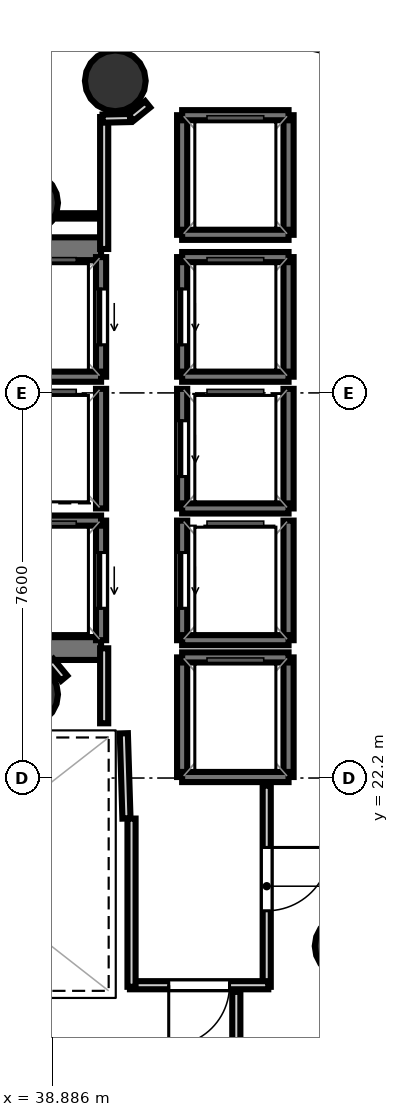
"""IFC4 building model, lengths in metres.
Left out: names, types, materials, properties, quantities, classifications, styles, units other than length and angle.
Written with IfcOpenShell. Run it as: python <this file> out.ifc"""

import sys

from ifc_helpers import new_model, si_unit, direction, frame, frame_2d, origin, origin_2d, place, context, subcontext, project, spatial, rectangle, hollow_circle, extrude, element, fill, save


model = new_model("IFC4")
c1 = context("Model", 3, precision=1e-05, world=origin(), true_north=direction((0.0, 1.0)))
c2 = subcontext(c1, "Body", "Model", "MODEL_VIEW")
j1 = project(units=[si_unit("LENGTHUNIT", "METRE"), si_unit("PLANEANGLEUNIT", "RADIAN")], contexts=[c1])
p1 = place(None, origin())
s1 = spatial("IfcSite", under=j1, at=p1, CompositionType="ELEMENT")
p2 = place(p1, origin())
s2 = spatial("IfcBuilding", under=s1, at=p2, CompositionType="ELEMENT")
p3 = place(p2, frame((0.0, 0.0, 196.6)))
s3 = spatial("IfcBuildingStorey", under=s2, at=p3, CompositionType="ELEMENT", Elevation=196.6)
p4 = place(p3, frame((29.33, 32.645, 0.0), z_axis=(0.0, 0.0, 1.0), x_axis=(1.0, 0.0, 0.0)))
e1 = element("IfcWall", 1, at=p4, inside=s3, PredefinedType="SHEAR", context=c2, shape_type="SweptSolid", body=[
    extrude(rectangle(XDim=10.52, YDim=0.45, at=frame_2d((5.26, 0.0))), origin(), (0.0, 0.0, 1.0), 3.52),
])
p5 = place(p4, frame((0.895, 0.0, 0.0)))
e2 = element("IfcOpeningElement", 2, at=p5, cuts=e1, PredefinedType="OPENING", context=c2, shape_type="SweptSolid", body=[
    extrude(rectangle(XDim=1.25, YDim=2.15, at=frame_2d((0.625, 1.075))), frame((0.0, 0.235, 0.0), z_axis=(0.0, -1.0, 0.0), x_axis=(1.0, 0.0, 0.0)), (0.0, 0.0, 1.0), 0.47),
])
p6 = place(p3, frame((29.33, 24.755, 0.0), z_axis=(0.0, 0.0, 1.0), x_axis=(1.0, 0.0, 0.0)))
e3 = element("IfcWall", 3, at=p6, inside=s3, PredefinedType="SHEAR", context=c2, shape_type="SweptSolid", body=[
    extrude(rectangle(XDim=10.52, YDim=0.45, at=frame_2d((5.26, 0.0))), origin(), (0.0, 0.0, 1.0), 3.52),
])
p7 = place(p6, frame((0.695, 0.0, 0.0)))
e4 = element("IfcOpeningElement", 4, at=p7, cuts=e3, PredefinedType="OPENING", context=c2, shape_type="SweptSolid", body=[
    extrude(rectangle(XDim=1.25, YDim=2.15, at=frame_2d((0.625, 1.075))), frame((0.0, 0.235, 0.0), z_axis=(0.0, -1.0, 0.0), x_axis=(1.0, 0.0, 0.0)), (0.0, 0.0, 1.0), 0.47),
])
for number, where, z_axis, x_axis in (
    (5, (38.4, 33.55, 0.0), (0.0, 0.0, 1.0), (1.0, 0.0, 0.0)),
    (6, (38.4, 23.85, 0.0), (0.0, 0.0, 1.0), (1.0, 0.0, 0.0)),
    (7, (40.131, 35.958, 0.0), (0.0, 0.0, 1.0), (1.0, 0.0, 0.0)),
    (8, (44.667, 18.883, 0.0), (0.0, 0.0, 1.0), (1.0, 0.0, 0.0)),
):
    element("IfcColumn", number, at=place(p3, frame(where, z_axis=z_axis, x_axis=x_axis)), inside=s3, PredefinedType="COLUMN", context=c2, shape_type="SweptSolid", body=[
        extrude(hollow_circle(Radius=0.6, WallThickness=0.03, at=origin_2d()), origin(), (0.0, 0.0, 1.0), 3.7),
    ])
p8 = place(p3, frame((39.85, 30.12, 0.0), z_axis=(0.0, 0.0, 1.0), x_axis=(0.0, 1.0, 0.0)))
e9 = element("IfcWall", 9, at=p8, inside=s3, PredefinedType="SOLIDWALL", context=c2, shape_type="SweptSolid", body=[
    extrude(rectangle(XDim=2.36, YDim=0.2, at=frame_2d((1.18, 0.0))), origin(), (0.0, 0.0, 1.0), 3.52),
])
p9 = place(p8, frame((0.63, 0.0, 0.0)))
e10 = element("IfcOpeningElement", 10, at=p9, cuts=e9, PredefinedType="OPENING", context=c2, shape_type="SweptSolid", body=[
    extrude(rectangle(XDim=1.1, YDim=2.15, at=frame_2d((0.55, 1.075))), frame((0.0, 0.11, 0.0), z_axis=(0.0, -1.0, 0.0), x_axis=(1.0, 0.0, 0.0)), (0.0, 0.0, 1.0), 0.22),
])
p10 = place(p3, frame((37.75, 30.12, 0.0), z_axis=(0.0, 0.0, 1.0), x_axis=(1.0, 0.0, 0.0)))
e11 = element("IfcWall", 11, at=p10, inside=s3, PredefinedType="SOLIDWALL", context=c2, shape_type="SweptSolid", body=[
    extrude(rectangle(XDim=2.1, YDim=0.2, at=frame_2d((1.05, 0.0))), origin(), (0.0, 0.0, 1.0), 3.52),
])
p11 = place(p3, frame((39.85, 24.92, 0.0), z_axis=(0.0, 0.0, 1.0), x_axis=(0.0, 1.0, 0.0)))
e12 = element("IfcWall", 12, at=p11, inside=s3, PredefinedType="SOLIDWALL", context=c2, shape_type="SweptSolid", body=[
    extrude(rectangle(XDim=2.36, YDim=0.2, at=frame_2d((1.18, 0.0))), origin(), (0.0, 0.0, 1.0), 3.52),
])
p12 = place(p11, frame((0.63, 0.0, 0.0)))
e13 = element("IfcOpeningElement", 13, at=p12, cuts=e12, PredefinedType="OPENING", context=c2, shape_type="SweptSolid", body=[
    extrude(rectangle(XDim=1.1, YDim=2.15, at=frame_2d((0.55, 1.075))), frame((0.0, 0.11, 0.0), z_axis=(0.0, -1.0, 0.0), x_axis=(1.0, 0.0, 0.0)), (0.0, 0.0, 1.0), 0.22),
])
p13 = place(p3, frame((37.75, 27.28, 0.0), z_axis=(0.0, 0.0, 1.0), x_axis=(1.0, 0.0, 0.0)))
e14 = element("IfcWall", 14, at=p13, inside=s3, PredefinedType="SOLIDWALL", context=c2, shape_type="SweptSolid", body=[
    extrude(rectangle(XDim=2.1, YDim=0.2, at=frame_2d((1.05, 0.0))), origin(), (0.0, 0.0, 1.0), 3.52),
])
p14 = place(p3, frame((43.55, 30.12, 0.0), z_axis=(0.0, 0.0, 1.0), x_axis=(0.0, 1.0, 0.0)))
e15 = element("IfcWall", 15, at=p14, inside=s3, PredefinedType="SOLIDWALL", context=c2, shape_type="SweptSolid", body=[
    extrude(rectangle(XDim=2.36, YDim=0.2, at=frame_2d((1.18, 0.0))), origin(), (0.0, 0.0, 1.0), 3.52),
])
p15 = place(p3, frame((41.45, 30.12, 0.0), z_axis=(0.0, 0.0, 1.0), x_axis=(0.0, 1.0, 0.0)))
e16 = element("IfcWall", 16, at=p15, inside=s3, PredefinedType="SOLIDWALL", context=c2, shape_type="SweptSolid", body=[
    extrude(rectangle(XDim=2.36, YDim=0.2, at=frame_2d((1.18, 0.0))), origin(), (0.0, 0.0, 1.0), 3.52),
])
p16 = place(p15, frame((0.63, 0.0, 0.0)))
e17 = element("IfcOpeningElement", 17, at=p16, cuts=e16, PredefinedType="OPENING", context=c2, shape_type="SweptSolid", body=[
    extrude(rectangle(XDim=1.1, YDim=2.15, at=frame_2d((0.55, 1.075))), frame((0.0, 0.11, 0.0), z_axis=(0.0, -1.0, 0.0), x_axis=(1.0, 0.0, 0.0)), (0.0, 0.0, 1.0), 0.22),
])
for number, where, z_axis, x_axis in (
    (18, (41.45, 32.48, 0.0), (0.0, 0.0, 1.0), (1.0, 0.0, 0.0)),
    (19, (41.45, 30.12, 0.0), (0.0, 0.0, 1.0), (1.0, 0.0, 0.0)),
):
    element("IfcWall", number, at=place(p3, frame(where, z_axis=z_axis, x_axis=x_axis)), inside=s3, PredefinedType="SOLIDWALL", context=c2, shape_type="SweptSolid", body=[
        extrude(rectangle(XDim=2.1, YDim=0.2, at=frame_2d((1.05, 0.0))), origin(), (0.0, 0.0, 1.0), 3.52),
    ])
p17 = place(p3, frame((43.55, 27.52, 0.0), z_axis=(0.0, 0.0, 1.0), x_axis=(0.0, 1.0, 0.0)))
e20 = element("IfcWall", 20, at=p17, inside=s3, PredefinedType="SOLIDWALL", context=c2, shape_type="SweptSolid", body=[
    extrude(rectangle(XDim=2.36, YDim=0.2, at=frame_2d((1.18, 0.0))), origin(), (0.0, 0.0, 1.0), 3.52),
])
p18 = place(p3, frame((41.45, 27.52, 0.0), z_axis=(0.0, 0.0, 1.0), x_axis=(0.0, 1.0, 0.0)))
e21 = element("IfcWall", 21, at=p18, inside=s3, PredefinedType="SOLIDWALL", context=c2, shape_type="SweptSolid", body=[
    extrude(rectangle(XDim=2.36, YDim=0.2, at=frame_2d((1.18, 0.0))), origin(), (0.0, 0.0, 1.0), 3.52),
])
p19 = place(p18, frame((0.63, 0.0, 0.0)))
e22 = element("IfcOpeningElement", 22, at=p19, cuts=e21, PredefinedType="OPENING", context=c2, shape_type="SweptSolid", body=[
    extrude(rectangle(XDim=1.1, YDim=2.15, at=frame_2d((0.55, 1.075))), frame((0.0, 0.11, 0.0), z_axis=(0.0, -1.0, 0.0), x_axis=(1.0, 0.0, 0.0)), (0.0, 0.0, 1.0), 0.22),
])
p20 = place(p3, frame((41.45, 27.52, 0.0), z_axis=(0.0, 0.0, 1.0), x_axis=(1.0, 0.0, 0.0)))
e23 = element("IfcWall", 23, at=p20, inside=s3, PredefinedType="SOLIDWALL", context=c2, shape_type="SweptSolid", body=[
    extrude(rectangle(XDim=2.1, YDim=0.2, at=frame_2d((1.05, 0.0))), origin(), (0.0, 0.0, 1.0), 3.52),
])
p21 = place(p3, frame((43.55, 24.92, 0.0), z_axis=(0.0, 0.0, 1.0), x_axis=(0.0, 1.0, 0.0)))
e24 = element("IfcWall", 24, at=p21, inside=s3, PredefinedType="SOLIDWALL", context=c2, shape_type="SweptSolid", body=[
    extrude(rectangle(XDim=2.36, YDim=0.2, at=frame_2d((1.18, 0.0))), origin(), (0.0, 0.0, 1.0), 3.52),
])
p22 = place(p3, frame((41.45, 24.92, 0.0), z_axis=(0.0, 0.0, 1.0), x_axis=(0.0, 1.0, 0.0)))
e25 = element("IfcWall", 25, at=p22, inside=s3, PredefinedType="SOLIDWALL", context=c2, shape_type="SweptSolid", body=[
    extrude(rectangle(XDim=2.36, YDim=0.2, at=frame_2d((1.18, 0.0))), origin(), (0.0, 0.0, 1.0), 3.52),
])
p23 = place(p22, frame((0.63, 0.0, 0.0)))
e26 = element("IfcOpeningElement", 26, at=p23, cuts=e25, PredefinedType="OPENING", context=c2, shape_type="SweptSolid", body=[
    extrude(rectangle(XDim=1.1, YDim=2.15, at=frame_2d((0.55, 1.075))), frame((0.0, 0.11, 0.0), z_axis=(0.0, -1.0, 0.0), x_axis=(1.0, 0.0, 0.0)), (0.0, 0.0, 1.0), 0.22),
])
p24 = place(p3, frame((41.45, 24.92, 0.0), z_axis=(0.0, 0.0, 1.0), x_axis=(1.0, 0.0, 0.0)))
e27 = element("IfcWall", 27, at=p24, inside=s3, PredefinedType="SOLIDWALL", context=c2, shape_type="SweptSolid", body=[
    extrude(rectangle(XDim=2.1, YDim=0.2, at=frame_2d((1.05, 0.0))), origin(), (0.0, 0.0, 1.0), 3.52),
])
p25 = place(p3, frame((39.85, 27.52, 0.0), z_axis=(0.0, 0.0, 1.0), x_axis=(0.0, 1.0, 0.0)))
e28 = element("IfcWall", 28, at=p25, inside=s3, PredefinedType="SOLIDWALL", context=c2, shape_type="SweptSolid", body=[
    extrude(rectangle(XDim=2.36, YDim=0.2, at=frame_2d((1.18, 0.0))), origin(), (0.0, 0.0, 1.0), 3.52),
])
for number, where, z_axis, x_axis in (
    (29, (43.55, 22.22, 0.0), (0.0, 0.0, 1.0), (0.0, 1.0, 0.0)),
    (30, (41.45, 22.22, 0.0), (0.0, 0.0, 1.0), (0.0, 1.0, 0.0)),
):
    element("IfcWall", number, at=place(p3, frame(where, z_axis=z_axis, x_axis=x_axis)), inside=s3, PredefinedType="SOLIDWALL", context=c2, shape_type="SweptSolid", body=[
        extrude(rectangle(XDim=2.36, YDim=0.2, at=frame_2d((1.18, 0.0))), origin(), (0.0, 0.0, 1.0), 3.52),
    ])
for number, where, z_axis, x_axis in (
    (31, (41.45, 24.58, 0.0), (0.0, 0.0, 1.0), (1.0, 0.0, 0.0)),
    (32, (41.45, 22.22, 0.0), (0.0, 0.0, 1.0), (1.0, 0.0, 0.0)),
):
    element("IfcWall", number, at=place(p3, frame(where, z_axis=z_axis, x_axis=x_axis)), inside=s3, PredefinedType="SOLIDWALL", context=c2, shape_type="SweptSolid", body=[
        extrude(rectangle(XDim=2.1, YDim=0.2, at=frame_2d((1.05, 0.0))), origin(), (0.0, 0.0, 1.0), 3.52),
    ])
for number, where, z_axis, x_axis in (
    (33, (43.55, 32.92, 0.0), (0.0, 0.0, 1.0), (0.0, 1.0, 0.0)),
    (34, (41.45, 32.92, 0.0), (0.0, 0.0, 1.0), (0.0, 1.0, 0.0)),
):
    element("IfcWall", number, at=place(p3, frame(where, z_axis=z_axis, x_axis=x_axis)), inside=s3, PredefinedType="SOLIDWALL", context=c2, shape_type="SweptSolid", body=[
        extrude(rectangle(XDim=2.36, YDim=0.2, at=frame_2d((1.18, 0.0))), origin(), (0.0, 0.0, 1.0), 3.52),
    ])
for number, where, z_axis, x_axis in (
    (35, (41.45, 35.28, 0.0), (0.0, 0.0, 1.0), (1.0, 0.0, 0.0)),
    (36, (41.45, 32.92, 0.0), (0.0, 0.0, 1.0), (1.0, 0.0, 0.0)),
):
    element("IfcWall", number, at=place(p3, frame(where, z_axis=z_axis, x_axis=x_axis)), inside=s3, PredefinedType="SOLIDWALL", context=c2, shape_type="SweptSolid", body=[
        extrude(rectangle(XDim=2.1, YDim=0.2, at=frame_2d((1.05, 0.0))), origin(), (0.0, 0.0, 1.0), 3.52),
    ])
p26 = place(p3, frame((40.351, 21.401, 0.0), z_axis=(0.0, 0.0, 1.0), x_axis=(-0.031058045979, 0.999517582527, 0.0)))
e37 = element("IfcWall", 37, at=p26, inside=s3, PredefinedType="PARTITIONING", context=c2, shape_type="SweptSolid", body=[
    extrude(rectangle(XDim=1.682, YDim=0.16, at=frame_2d((0.841, 0.0))), origin(), (0.0, 0.0, 1.0), 2.84),
])
p27 = place(p3, frame((39.911, 23.28, 0.0), z_axis=(0.0, 0.0, 1.0), x_axis=(0.0, 1.0, 0.0)))
e38 = element("IfcWall", 38, at=p27, inside=s3, PredefinedType="PARTITIONING", context=c2, shape_type="SweptSolid", body=[
    extrude(rectangle(XDim=1.48, YDim=0.16, at=frame_2d((0.74, 0.0))), origin(), (0.0, 0.0, 1.0), 2.84),
])
p28 = place(p3, frame((39.911, 32.64, 0.0), z_axis=(0.0, 0.0, 1.0), x_axis=(0.0, 1.0, 0.0)))
e39 = element("IfcWall", 39, at=p28, inside=s3, PredefinedType="PARTITIONING", context=c2, shape_type="SweptSolid", body=[
    extrude(rectangle(XDim=2.604, YDim=0.16, at=frame_2d((1.302, 0.0))), origin(), (0.0, 0.0, 1.0), 2.84),
])
p29 = place(p3, frame((39.881, 35.213, 0.0), z_axis=(0.0, 0.0, 1.0), x_axis=(0.999756500784, 0.02206669754, 0.0)))
e40 = element("IfcWall", 40, at=p29, inside=s3, PredefinedType="PARTITIONING", context=c2, shape_type="SweptSolid", body=[
    extrude(rectangle(XDim=0.542, YDim=0.16, at=frame_2d((0.271, 0.0))), origin(), (0.0, 0.0, 1.0), 2.84),
])
p30 = place(p3, frame((40.441, 35.232, 0.0), z_axis=(0.0, 0.0, 1.0), x_axis=(0.778714564707, 0.627378376033, 0.0)))
e41 = element("IfcWall", 41, at=p30, inside=s3, PredefinedType="PARTITIONING", context=c2, shape_type="SweptSolid", body=[
    extrude(rectangle(XDim=0.421, YDim=0.16, at=frame_2d((0.21, 0.0))), origin(), (0.0, 0.0, 1.0), 2.84),
])
p31 = place(p3, frame((43.119, 22.05, 0.0), z_axis=(0.0, 0.0, 1.0), x_axis=(0.0, -1.0, 0.0)))
e42 = element("IfcWall", 42, at=p31, inside=s3, PredefinedType="PARTITIONING", context=c2, shape_type="SweptSolid", body=[
    extrude(rectangle(XDim=3.97, YDim=0.16, at=frame_2d((1.985, 0.0))), origin(), (0.0, 0.0, 1.0), 2.84),
])
p32 = place(p31, frame((1.22, 0.0, 0.0)))
e43 = element("IfcOpeningElement", 43, at=p32, cuts=e42, PredefinedType="OPENING", context=c2, shape_type="SweptSolid", body=[
    extrude(rectangle(XDim=1.25, YDim=2.2, at=frame_2d((0.625, 1.1))), frame((0.0, 0.09, 0.0), z_axis=(0.0, -1.0, 0.0), x_axis=(1.0, 0.0, 0.0)), (0.0, 0.0, 1.0), 0.18),
])
p33 = place(p3, frame((43.15, 18.111, 0.0), z_axis=(0.0, 0.0, 1.0), x_axis=(-1.0, 0.0, 0.0)))
e44 = element("IfcWall", 44, at=p33, inside=s3, PredefinedType="PARTITIONING", context=c2, shape_type="SweptSolid", body=[
    extrude(rectangle(XDim=2.73, YDim=0.16, at=frame_2d((1.365, 0.0))), origin(), (0.0, 0.0, 1.0), 2.84),
])
p34 = place(p33, frame((0.765, 0.0, 0.0)))
e45 = element("IfcOpeningElement", 45, at=p34, cuts=e44, PredefinedType="OPENING", context=c2, shape_type="SweptSolid", body=[
    extrude(rectangle(XDim=1.2, YDim=2.15, at=frame_2d((0.6, 1.075))), frame((0.0, 0.09, 0.0), z_axis=(0.0, -1.0, 0.0), x_axis=(1.0, 0.0, 0.0)), (0.0, 0.0, 1.0), 0.18),
])
p35 = place(p3, frame((40.451, 18.08, 0.0), z_axis=(0.0, 0.0, 1.0), x_axis=(0.0, 1.0, 0.0)))
e46 = element("IfcWall", 46, at=p35, inside=s3, PredefinedType="PARTITIONING", context=c2, shape_type="SweptSolid", body=[
    extrude(rectangle(XDim=3.32, YDim=0.16, at=frame_2d((1.66, 0.0))), origin(), (0.0, 0.0, 1.0), 2.84),
])
p36 = place(p3, frame((39.121, 24.17, 0.0), z_axis=(0.0, 0.0, 1.0), x_axis=(-0.638008265708, 0.770029514296, 0.0)))
e47 = element("IfcWall", 47, at=p36, inside=s3, PredefinedType="PARTITIONING", context=c2, shape_type="SweptSolid", body=[
    extrude(rectangle(XDim=0.431, YDim=0.16, at=frame_2d((0.215, 0.0))), origin(), (0.0, 0.0, 1.0), 2.84),
])
p37 = place(p3, frame((42.519, 17.98, 0.0), z_axis=(0.0, 0.0, 1.0), x_axis=(0.0, -1.0, 0.0)))
e48 = element("IfcWall", 48, at=p37, inside=s3, PredefinedType="PARTITIONING", context=c2, shape_type="SweptSolid", body=[
    extrude(rectangle(XDim=2.969, YDim=0.16, at=frame_2d((1.485, 0.0))), origin(), (0.0, 0.0, 1.0), 2.84),
])
p38 = place(p3, frame((39.8, 33.293, 0.0), z_axis=(0.0, 0.0, 1.0), x_axis=(-1.0, 0.0, 0.0)))
e49 = element("IfcWall", 49, at=p38, inside=s3, PredefinedType="PARTITIONING", context=c2, shape_type="SweptSolid", body=[
    extrude(rectangle(XDim=2.87, YDim=0.105, at=frame_2d((1.435, 0.0))), origin(), (0.0, 0.0, 1.0), 2.84),
])
p39 = place(p9, origin())
e50 = element("IfcDoor", 50, at=p39, inside=s3, OperationType="SLIDING_TO_LEFT", PredefinedType="DOOR", context=c2, shape_type="SweptSolid", body=[
    extrude(rectangle(XDim=1.1, YDim=2.15, at=frame_2d((0.55, 1.075))), frame((0.0, 0.025, 0.0), z_axis=(0.0, -1.0, 0.0), x_axis=(1.0, 0.0, 0.0)), (0.0, 0.0, 1.0), 0.05),
])
fill(e10, e50)
p40 = place(p12, origin())
e51 = element("IfcDoor", 51, at=p40, inside=s3, OperationType="SLIDING_TO_LEFT", PredefinedType="DOOR", context=c2, shape_type="SweptSolid", body=[
    extrude(rectangle(XDim=1.1, YDim=2.15, at=frame_2d((0.55, 1.075))), frame((0.0, 0.025, 0.0), z_axis=(0.0, -1.0, 0.0), x_axis=(1.0, 0.0, 0.0)), (0.0, 0.0, 1.0), 0.05),
])
fill(e13, e51)
p41 = place(p16, origin())
e52 = element("IfcDoor", 52, at=p41, inside=s3, OperationType="SLIDING_TO_LEFT", PredefinedType="DOOR", context=c2, shape_type="SweptSolid", body=[
    extrude(rectangle(XDim=1.1, YDim=2.15, at=frame_2d((0.55, 1.075))), frame((0.0, 0.025, 0.0), z_axis=(0.0, -1.0, 0.0), x_axis=(1.0, 0.0, 0.0)), (0.0, 0.0, 1.0), 0.05),
])
fill(e17, e52)
p42 = place(p19, origin())
e53 = element("IfcDoor", 53, at=p42, inside=s3, OperationType="SLIDING_TO_LEFT", PredefinedType="DOOR", context=c2, shape_type="SweptSolid", body=[
    extrude(rectangle(XDim=1.1, YDim=2.15, at=frame_2d((0.55, 1.075))), frame((0.0, 0.025, 0.0), z_axis=(0.0, -1.0, 0.0), x_axis=(1.0, 0.0, 0.0)), (0.0, 0.0, 1.0), 0.05),
])
fill(e22, e53)
p43 = place(p23, origin())
e54 = element("IfcDoor", 54, at=p43, inside=s3, OperationType="SLIDING_TO_LEFT", PredefinedType="DOOR", context=c2, shape_type="SweptSolid", body=[
    extrude(rectangle(XDim=1.1, YDim=2.15, at=frame_2d((0.55, 1.075))), frame((0.0, 0.025, 0.0), z_axis=(0.0, -1.0, 0.0), x_axis=(1.0, 0.0, 0.0)), (0.0, 0.0, 1.0), 0.05),
])
fill(e26, e54)
p44 = place(p34, origin())
e55 = element("IfcDoor", 55, at=p44, inside=s3, OperationType="SINGLE_SWING_RIGHT", PredefinedType="DOOR", context=c2, shape_type="SweptSolid", body=[
    extrude(rectangle(XDim=1.2, YDim=2.15, at=frame_2d((0.6, 1.075))), frame((0.0, 0.025, 0.0), z_axis=(0.0, -1.0, 0.0), x_axis=(1.0, 0.0, 0.0)), (0.0, 0.0, 1.0), 0.05),
])
fill(e45, e55)
p45 = place(p32, origin())
e56 = element("IfcDoor", 56, at=p45, inside=s3, OperationType="SINGLE_SWING_LEFT", PredefinedType="DOOR", context=c2, shape_type="SweptSolid", body=[
    extrude(rectangle(XDim=1.25, YDim=2.2, at=frame_2d((0.625, 1.1))), frame((0.0, 0.025, 0.0), z_axis=(0.0, -1.0, 0.0), x_axis=(1.0, 0.0, 0.0)), (0.0, 0.0, 1.0), 0.05),
])
fill(e43, e56)
save(model, sys.argv[1])
